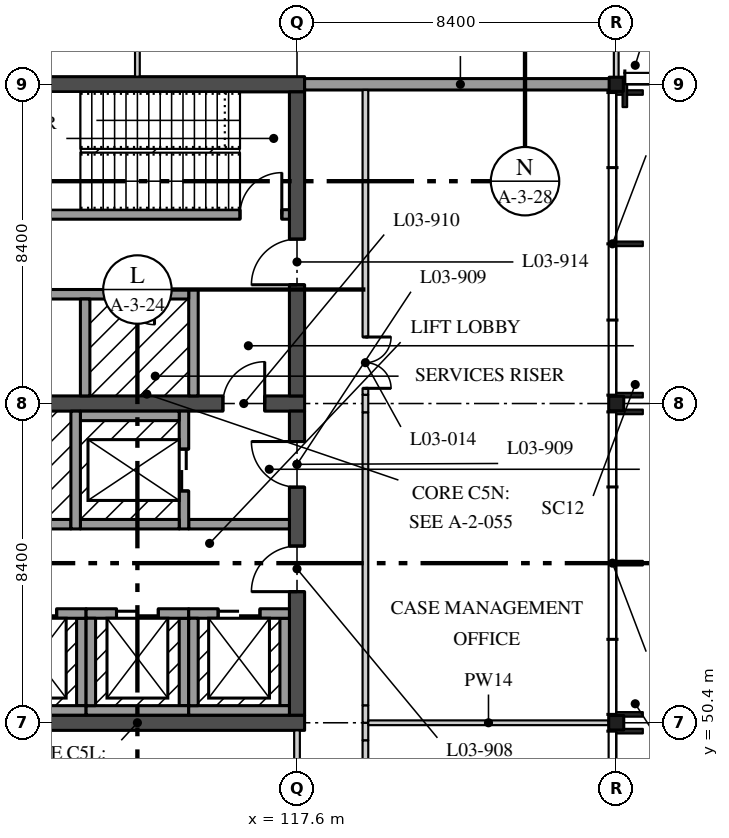
"""IFC4 building model, lengths in metres.
Left out: names, types, materials, properties, quantities, classifications, styles, units other than length and angle.
Written with IfcOpenShell. Run it as: python <this file> out.ifc"""

import sys

from ifc_helpers import new_model, si_unit, direction, frame, frame_2d, origin, origin_2d, place, context, subcontext, project, spatial, rectangle, i_section, extrude, element, fill, save


model = new_model("IFC4")
c1 = context("Model", 3, precision=1e-05, world=origin(), true_north=direction((0.0, 1.0)))
c2 = subcontext(c1, "Body", "Model", "MODEL_VIEW")
j1 = project(units=[si_unit("LENGTHUNIT", "METRE"), si_unit("PLANEANGLEUNIT", "RADIAN")], contexts=[c1])
p1 = place(None, origin())
s1 = spatial("IfcSite", under=j1, at=p1, CompositionType="ELEMENT")
p2 = place(p1, origin())
s2 = spatial("IfcBuilding", under=s1, at=p2, CompositionType="ELEMENT")
p3 = place(p2, frame((0.0, 0.0, 14.4)))
s3 = spatial("IfcBuildingStorey", under=s2, at=p3, CompositionType="ELEMENT", Elevation=14.4)
for number, where, z_axis, x_axis in (
    (1, (126.0, 50.4, 0.0), (0.0, 0.0, 1.0), (1.0, 0.0, 0.0)),
    (2, (126.0, 58.8, 0.0), (0.0, 0.0, 1.0), (1.0, 0.0, 0.0)),
):
    element("IfcColumn", number, at=place(p3, frame(where, z_axis=z_axis, x_axis=x_axis)), inside=s3, PredefinedType="COLUMN", context=c2, shape_type="SweptSolid", body=[
        extrude(i_section(OverallWidth=0.396, OverallDepth=0.381, WebThickness=0.019, FlangeThickness=0.03, FilletRadius=0.015, at=origin_2d()), origin(), (0.0, 0.0, 1.0), 4.37),
    ])
p4 = place(p3, frame((126.0, 67.2, 0.0), z_axis=(0.0, 0.0, 1.0), x_axis=(1.0, 0.0, 0.0)))
e3 = element("IfcColumn", 3, at=p4, inside=s3, PredefinedType="COLUMN", context=c2, shape_type="SweptSolid", body=[
    extrude(i_section(OverallWidth=0.373, OverallDepth=0.373, WebThickness=0.016, FlangeThickness=0.026, FilletRadius=0.015, at=origin_2d()), origin(), (0.0, 0.0, 1.0), 4.37),
])
p5 = place(p3, frame((109.0, 50.4, 0.0), z_axis=(0.0, 0.0, 1.0), x_axis=(1.0, 0.0, 0.0)))
e4 = element("IfcWall", 4, at=p5, inside=s3, PredefinedType="SHEAR", context=c2, shape_type="SweptSolid", body=[
    extrude(rectangle(XDim=8.8, YDim=0.4, at=frame_2d((4.4, 0.0))), origin(), (0.0, 0.0, 1.0), 4.37),
])
p6 = place(p3, frame((109.0, 58.8, 0.0), z_axis=(0.0, 0.0, 1.0), x_axis=(1.0, 0.0, 0.0)))
e5 = element("IfcWall", 5, at=p6, inside=s3, PredefinedType="SHEAR", context=c2, shape_type="SweptSolid", body=[
    extrude(rectangle(XDim=8.8, YDim=0.4, at=frame_2d((4.4, 0.0))), origin(), (0.0, 0.0, 1.0), 4.37),
])
p7 = place(p6, frame((6.65, 0.0, 0.0)))
e6 = element("IfcOpeningElement", 6, at=p7, cuts=e5, PredefinedType="OPENING", context=c2, shape_type="SweptSolid", body=[
    extrude(rectangle(XDim=1.1, YDim=2.1, at=frame_2d((0.55, 1.05))), frame((0.0, 0.21, 0.0), z_axis=(0.0, -1.0, 0.0), x_axis=(1.0, 0.0, 0.0)), (0.0, 0.0, 1.0), 0.42),
])
p8 = place(p3, frame((117.6, 50.6, 0.0), z_axis=(0.0, 0.0, 1.0), x_axis=(0.0, 1.0, 0.0)))
e7 = element("IfcWall", 7, at=p8, inside=s3, PredefinedType="SHEAR", context=c2, shape_type="SweptSolid", body=[
    extrude(rectangle(XDim=8.0, YDim=0.4, at=frame_2d((4.0, 0.0))), origin(), (0.0, 0.0, 1.0), 4.37),
])
p9 = place(p8, frame((3.25, 0.0, 0.0)))
e8 = element("IfcOpeningElement", 8, at=p9, cuts=e7, PredefinedType="OPENING", context=c2, shape_type="SweptSolid", body=[
    extrude(rectangle(XDim=1.2, YDim=2.1, at=frame_2d((0.6, 1.05))), frame((0.0, 0.21, 0.0), z_axis=(0.0, -1.0, 0.0), x_axis=(1.0, 0.0, 0.0)), (0.0, 0.0, 1.0), 0.42),
])
p10 = place(p8, frame((6.0, 0.0, 0.0)))
e9 = element("IfcOpeningElement", 9, at=p10, cuts=e7, PredefinedType="OPENING", context=c2, shape_type="SweptSolid", body=[
    extrude(rectangle(XDim=1.2, YDim=2.1, at=frame_2d((0.6, 1.05))), frame((0.0, 0.21, 0.0), z_axis=(0.0, -1.0, 0.0), x_axis=(1.0, 0.0, 0.0)), (0.0, 0.0, 1.0), 0.42),
])
p11 = place(p3, frame((109.4, 55.625, 0.0), z_axis=(0.0, 0.0, 1.0), x_axis=(1.0, 0.0, 0.0)))
e10 = element("IfcWall", 10, at=p11, inside=s3, PredefinedType="SOLIDWALL", context=c2, shape_type="SweptSolid", body=[
    extrude(rectangle(XDim=2.25, YDim=0.25, at=frame_2d((1.125, 0.0))), origin(), (0.0, 0.0, 1.0), 4.37),
])
p12 = place(p11, frame((0.675, 0.0, 0.0)))
e11 = element("IfcOpeningElement", 11, at=p12, cuts=e10, PredefinedType="OPENING", context=c2, shape_type="SweptSolid", body=[
    extrude(rectangle(XDim=0.9, YDim=2.1, at=frame_2d((0.45, 1.05))), frame((0.0, 0.135, 0.0), z_axis=(0.0, -1.0, 0.0), x_axis=(1.0, 0.0, 0.0)), (0.0, 0.0, 1.0), 0.27),
])
p13 = place(p3, frame((114.75, 55.625, 0.0), z_axis=(0.0, 0.0, 1.0), x_axis=(1.0, 0.0, 0.0)))
e12 = element("IfcWall", 12, at=p13, inside=s3, PredefinedType="SOLIDWALL", context=c2, shape_type="SweptSolid", body=[
    extrude(rectangle(XDim=2.65, YDim=0.25, at=frame_2d((1.325, 0.0))), origin(), (0.0, 0.0, 1.0), 4.37),
])
p14 = place(p3, frame((109.0, 67.2, 0.0), z_axis=(0.0, 0.0, 1.0), x_axis=(1.0, 0.0, 0.0)))
e13 = element("IfcWall", 13, at=p14, inside=s3, PredefinedType="SHEAR", context=c2, shape_type="SweptSolid", body=[
    extrude(rectangle(XDim=8.8, YDim=0.4, at=frame_2d((4.4, 0.0))), origin(), (0.0, 0.0, 1.0), 4.37),
])
p15 = place(p3, frame((117.6, 59.0, 0.0), z_axis=(0.0, 0.0, 1.0), x_axis=(0.0, 1.0, 0.0)))
e14 = element("IfcWall", 14, at=p15, inside=s3, PredefinedType="SHEAR", context=c2, shape_type="SweptSolid", body=[
    extrude(rectangle(XDim=8.0, YDim=0.4, at=frame_2d((4.0, 0.0))), origin(), (0.0, 0.0, 1.0), 4.37),
])
p16 = place(p15, frame((2.925, 0.0, 0.0)))
e15 = element("IfcOpeningElement", 15, at=p16, cuts=e14, PredefinedType="OPENING", context=c2, shape_type="SweptSolid", body=[
    extrude(rectangle(XDim=1.2, YDim=2.1, at=frame_2d((0.6, 1.05))), frame((0.0, 0.21, 0.0), z_axis=(0.0, -1.0, 0.0), x_axis=(1.0, 0.0, 0.0)), (0.0, 0.0, 1.0), 0.42),
])
p17 = place(p3, frame((117.4, 63.775, 0.0), z_axis=(0.0, 0.0, 1.0), x_axis=(-1.0, 0.0, 0.0)))
e16 = element("IfcWall", 16, at=p17, inside=s3, PredefinedType="SOLIDWALL", context=c2, shape_type="SweptSolid", body=[
    extrude(rectangle(XDim=8.0, YDim=0.25, at=frame_2d((4.0, 0.0))), origin(), (0.0, 0.0, 1.0), 4.37),
])
p18 = place(p17, frame((0.2, 0.0, 0.0)))
e17 = element("IfcOpeningElement", 17, at=p18, cuts=e16, PredefinedType="OPENING", context=c2, shape_type="SweptSolid", body=[
    extrude(rectangle(XDim=1.1, YDim=2.1, at=frame_2d((0.55, 1.05))), frame((0.0, 0.135, 0.0), z_axis=(0.0, -1.0, 0.0), x_axis=(1.0, 0.0, 0.0)), (0.0, 0.0, 1.0), 0.27),
])
p19 = place(p3, frame((114.875, 61.8, 0.0), z_axis=(0.0, 0.0, 1.0), x_axis=(0.0, -1.0, 0.0)))
e18 = element("IfcWall", 18, at=p19, inside=s3, PredefinedType="SOLIDWALL", context=c2, shape_type="SweptSolid", body=[
    extrude(rectangle(XDim=2.8, YDim=0.25, at=frame_2d((1.4, 0.0))), origin(), (0.0, 0.0, 1.0), 4.37),
])
p20 = place(p3, frame((114.75, 61.675, 0.0), z_axis=(0.0, 0.0, 1.0), x_axis=(-1.0, 0.0, 0.0)))
e19 = element("IfcWall", 19, at=p20, inside=s3, PredefinedType="SOLIDWALL", context=c2, shape_type="SweptSolid", body=[
    extrude(rectangle(XDim=5.35, YDim=0.25, at=frame_2d((2.675, 0.0))), origin(), (0.0, 0.0, 1.0), 4.37),
])
p21 = place(p20, frame((3.65, 0.0, 0.0)))
e20 = element("IfcOpeningElement", 20, at=p21, cuts=e19, PredefinedType="OPENING", context=c2, shape_type="SweptSolid", body=[
    extrude(rectangle(XDim=0.9, YDim=2.1, at=frame_2d((0.45, 1.05))), frame((0.0, 0.135, 0.0), z_axis=(0.0, -1.0, 0.0), x_axis=(1.0, 0.0, 0.0)), (0.0, 0.0, 1.0), 0.27),
])
p22 = place(p20, frame((0.9, 0.0, 0.0)))
e21 = element("IfcOpeningElement", 21, at=p22, cuts=e19, PredefinedType="OPENING", context=c2, shape_type="SweptSolid", body=[
    extrude(rectangle(XDim=0.8, YDim=2.1, at=frame_2d((0.4, 1.05))), frame((0.0, 0.135, 0.0), z_axis=(0.0, -1.0, 0.0), x_axis=(1.0, 0.0, 0.0)), (0.0, 0.0, 1.0), 0.27),
])
p23 = place(p3, frame((112.025, 61.55, 0.0), z_axis=(0.0, 0.0, 1.0), x_axis=(0.0, -1.0, 0.0)))
e22 = element("IfcWall", 22, at=p23, inside=s3, PredefinedType="SOLIDWALL", context=c2, shape_type="SweptSolid", body=[
    extrude(rectangle(XDim=2.55, YDim=0.25, at=frame_2d((1.275, 0.0))), origin(), (0.0, 0.0, 1.0), 4.37),
])
p24 = place(p3, frame((114.625, 55.5, 0.0), z_axis=(0.0, 0.0, 1.0), x_axis=(0.0, 1.0, 0.0)))
e23 = element("IfcWall", 23, at=p24, inside=s3, PredefinedType="SOLIDWALL", context=c2, shape_type="SweptSolid", body=[
    extrude(rectangle(XDim=3.1, YDim=0.25, at=frame_2d((1.55, 0.0))), origin(), (0.0, 0.0, 1.0), 4.37),
])
p25 = place(p24, frame((1.0, 0.0, 0.0)))
e24 = element("IfcOpeningElement", 24, at=p25, cuts=e23, PredefinedType="OPENING", context=c2, shape_type="SweptSolid", body=[
    extrude(rectangle(XDim=1.1, YDim=2.1, at=frame_2d((0.55, 1.05))), frame((0.0, 0.135, 0.0), z_axis=(0.0, -1.0, 0.0), x_axis=(1.0, 0.0, 0.0)), (0.0, 0.0, 1.0), 0.27),
])
for number, where, z_axis, x_axis in (
    (25, (111.9, 58.475, 0.0), (0.0, 0.0, 1.0), (1.0, 0.0, 0.0)),
    (26, (111.9, 55.625, 0.0), (0.0, 0.0, 1.0), (1.0, 0.0, 0.0)),
):
    element("IfcWall", number, at=place(p3, frame(where, z_axis=z_axis, x_axis=x_axis)), inside=s3, PredefinedType="SOLIDWALL", context=c2, shape_type="SweptSolid", body=[
        extrude(rectangle(XDim=2.6, YDim=0.25, at=frame_2d((1.3, 0.0))), origin(), (0.0, 0.0, 1.0), 4.37),
    ])
p26 = place(p3, frame((111.775, 55.5, 0.0), z_axis=(0.0, 0.0, 1.0), x_axis=(0.0, 1.0, 0.0)))
e27 = element("IfcWall", 27, at=p26, inside=s3, PredefinedType="SOLIDWALL", context=c2, shape_type="SweptSolid", body=[
    extrude(rectangle(XDim=3.1, YDim=0.25, at=frame_2d((1.55, 0.0))), origin(), (0.0, 0.0, 1.0), 4.37),
])
p27 = place(p3, frame((111.925, 50.85, 0.0), z_axis=(0.0, 0.0, 1.0), x_axis=(0.0, 1.0, 0.0)))
e28 = element("IfcWall", 28, at=p27, inside=s3, PredefinedType="SOLIDWALL", context=c2, shape_type="SweptSolid", body=[
    extrude(rectangle(XDim=2.3, YDim=0.25, at=frame_2d((1.15, 0.0))), origin(), (0.0, 0.0, 1.0), 4.37),
])
p28 = place(p3, frame((109.4, 53.275, 0.0), z_axis=(0.0, 0.0, 1.0), x_axis=(1.0, 0.0, 0.0)))
e29 = element("IfcWall", 29, at=p28, inside=s3, PredefinedType="SOLIDWALL", context=c2, shape_type="SweptSolid", body=[
    extrude(rectangle(XDim=2.65, YDim=0.25, at=frame_2d((1.325, 0.0))), origin(), (0.0, 0.0, 1.0), 4.37),
])
p29 = place(p28, frame((0.775, 0.0, 0.0)))
e30 = element("IfcOpeningElement", 30, at=p29, cuts=e29, PredefinedType="OPENING", context=c2, shape_type="SweptSolid", body=[
    extrude(rectangle(XDim=1.1, YDim=2.1, at=frame_2d((0.55, 1.05))), frame((0.0, 0.135, 0.0), z_axis=(0.0, -1.0, 0.0), x_axis=(1.0, 0.0, 0.0)), (0.0, 0.0, 1.0), 0.27),
])
p30 = place(p3, frame((109.4, 50.725, 0.0), z_axis=(0.0, 0.0, 1.0), x_axis=(1.0, 0.0, 0.0)))
e31 = element("IfcWall", 31, at=p30, inside=s3, PredefinedType="SOLIDWALL", context=c2, shape_type="SweptSolid", body=[
    extrude(rectangle(XDim=2.65, YDim=0.25, at=frame_2d((1.325, 0.0))), origin(), (0.0, 0.0, 1.0), 4.37),
])
p31 = place(p3, frame((114.625, 50.85, 0.0), z_axis=(0.0, 0.0, 1.0), x_axis=(0.0, 1.0, 0.0)))
e32 = element("IfcWall", 32, at=p31, inside=s3, PredefinedType="SOLIDWALL", context=c2, shape_type="SweptSolid", body=[
    extrude(rectangle(XDim=2.3, YDim=0.25, at=frame_2d((1.15, 0.0))), origin(), (0.0, 0.0, 1.0), 4.37),
])
p32 = place(p3, frame((112.05, 53.275, 0.0), z_axis=(0.0, 0.0, 1.0), x_axis=(1.0, 0.0, 0.0)))
e33 = element("IfcWall", 33, at=p32, inside=s3, PredefinedType="SOLIDWALL", context=c2, shape_type="SweptSolid", body=[
    extrude(rectangle(XDim=2.7, YDim=0.25, at=frame_2d((1.35, 0.0))), origin(), (0.0, 0.0, 1.0), 4.37),
])
p33 = place(p32, frame((0.8, 0.0, 0.0)))
e34 = element("IfcOpeningElement", 34, at=p33, cuts=e33, PredefinedType="OPENING", context=c2, shape_type="SweptSolid", body=[
    extrude(rectangle(XDim=1.1, YDim=2.1, at=frame_2d((0.55, 1.05))), frame((0.0, 0.135, 0.0), z_axis=(0.0, -1.0, 0.0), x_axis=(1.0, 0.0, 0.0)), (0.0, 0.0, 1.0), 0.27),
])
p34 = place(p3, frame((112.05, 50.725, 0.0), z_axis=(0.0, 0.0, 1.0), x_axis=(1.0, 0.0, 0.0)))
e35 = element("IfcWall", 35, at=p34, inside=s3, PredefinedType="SOLIDWALL", context=c2, shape_type="SweptSolid", body=[
    extrude(rectangle(XDim=2.7, YDim=0.25, at=frame_2d((1.35, 0.0))), origin(), (0.0, 0.0, 1.0), 4.37),
])
for number, where, z_axis, x_axis in (
    (36, (112.175, 50.85, 0.0), (0.0, 0.0, 1.0), (0.0, 1.0, 0.0)),
    (37, (117.275, 50.85, 0.0), (0.0, 0.0, 1.0), (0.0, 1.0, 0.0)),
):
    element("IfcWall", number, at=place(p3, frame(where, z_axis=z_axis, x_axis=x_axis)), inside=s3, PredefinedType="SOLIDWALL", context=c2, shape_type="SweptSolid", body=[
        extrude(rectangle(XDim=2.3, YDim=0.25, at=frame_2d((1.15, 0.0))), origin(), (0.0, 0.0, 1.0), 4.37),
    ])
p35 = place(p3, frame((114.75, 53.275, 0.0), z_axis=(0.0, 0.0, 1.0), x_axis=(1.0, 0.0, 0.0)))
e38 = element("IfcWall", 38, at=p35, inside=s3, PredefinedType="SOLIDWALL", context=c2, shape_type="SweptSolid", body=[
    extrude(rectangle(XDim=2.65, YDim=0.25, at=frame_2d((1.325, 0.0))), origin(), (0.0, 0.0, 1.0), 4.37),
])
p36 = place(p35, frame((0.775, 0.0, 0.0)))
e39 = element("IfcOpeningElement", 39, at=p36, cuts=e38, PredefinedType="OPENING", context=c2, shape_type="SweptSolid", body=[
    extrude(rectangle(XDim=1.1, YDim=2.1, at=frame_2d((0.55, 1.05))), frame((0.0, 0.135, 0.0), z_axis=(0.0, -1.0, 0.0), x_axis=(1.0, 0.0, 0.0)), (0.0, 0.0, 1.0), 0.27),
])
p37 = place(p3, frame((114.75, 50.725, 0.0), z_axis=(0.0, 0.0, 1.0), x_axis=(1.0, 0.0, 0.0)))
e40 = element("IfcWall", 40, at=p37, inside=s3, PredefinedType="SOLIDWALL", context=c2, shape_type="SweptSolid", body=[
    extrude(rectangle(XDim=2.65, YDim=0.25, at=frame_2d((1.325, 0.0))), origin(), (0.0, 0.0, 1.0), 4.37),
])
p38 = place(p3, frame((114.875, 50.85, 0.0), z_axis=(0.0, 0.0, 1.0), x_axis=(0.0, 1.0, 0.0)))
e41 = element("IfcWall", 41, at=p38, inside=s3, PredefinedType="SOLIDWALL", context=c2, shape_type="SweptSolid", body=[
    extrude(rectangle(XDim=2.3, YDim=0.25, at=frame_2d((1.15, 0.0))), origin(), (0.0, 0.0, 1.0), 4.37),
])
p39 = place(p3, frame((119.4, 42.23, 0.0), z_axis=(0.0, 0.0, 1.0), x_axis=(0.0, 1.0, 0.0)))
e42 = element("IfcWall", 42, at=p39, inside=s3, PredefinedType="PARTITIONING", context=c2, shape_type="SweptSolid", body=[
    extrude(rectangle(XDim=7.71, YDim=0.15, at=frame_2d((3.855, 0.0))), origin(), (0.0, 0.0, 1.0), 4.37),
])
p40 = place(p3, frame((119.4, 49.94, 0.0), z_axis=(0.0, 0.0, 1.0), x_axis=(0.0, 1.0, 0.0)))
e43 = element("IfcWall", 43, at=p40, inside=s3, PredefinedType="PARTITIONING", context=c2, shape_type="SweptSolid", body=[
    extrude(rectangle(XDim=0.46, YDim=0.15, at=frame_2d((0.23, 0.0))), origin(), (0.0, 0.0, 1.0), 3.746),
])
p41 = place(p3, frame((119.4, 50.4, 0.0), z_axis=(0.0, 0.0, 1.0), x_axis=(0.0, 1.0, 0.0)))
e44 = element("IfcWall", 44, at=p41, inside=s3, PredefinedType="PARTITIONING", context=c2, shape_type="SweptSolid", body=[
    extrude(rectangle(XDim=0.46, YDim=0.15, at=frame_2d((0.23, 0.0))), origin(), (0.0, 0.0, 1.0), 3.746),
])
p42 = place(p3, frame((119.4, 50.86, 0.0), z_axis=(0.0, 0.0, 1.0), x_axis=(0.0, 1.0, 0.0)))
e45 = element("IfcWall", 45, at=p42, inside=s3, PredefinedType="PARTITIONING", context=c2, shape_type="SweptSolid", body=[
    extrude(rectangle(XDim=7.71, YDim=0.15, at=frame_2d((3.855, 0.0))), origin(), (0.0, 0.0, 1.0), 4.37),
])
p43 = place(p3, frame((119.4, 58.57, 0.0), z_axis=(0.0, 0.0, 1.0), x_axis=(0.0, 1.0, 0.0)))
e46 = element("IfcWall", 46, at=p43, inside=s3, PredefinedType="PARTITIONING", context=c2, shape_type="SweptSolid", body=[
    extrude(rectangle(XDim=0.46, YDim=0.15, at=frame_2d((0.23, 0.0))), origin(), (0.0, 0.0, 1.0), 3.746),
])
p44 = place(p3, frame((119.4, 59.03, 0.0), z_axis=(0.0, 0.0, 1.0), x_axis=(0.0, 1.0, 0.0)))
e47 = element("IfcWall", 47, at=p44, inside=s3, PredefinedType="PARTITIONING", context=c2, shape_type="SweptSolid", body=[
    extrude(rectangle(XDim=8.02, YDim=0.15, at=frame_2d((4.01, 0.0))), origin(), (0.0, 0.0, 1.0), 4.37),
])
p45 = place(p44, frame((0.17, 0.0, 0.0)))
e48 = element("IfcOpeningElement", 48, at=p45, cuts=e47, PredefinedType="OPENING", context=c2, shape_type="SweptSolid", body=[
    extrude(rectangle(XDim=1.35, YDim=2.1, at=frame_2d((0.675, 1.05))), frame((0.0, 0.085, 0.0), z_axis=(0.0, -1.0, 0.0), x_axis=(1.0, 0.0, 0.0)), (0.0, 0.0, 1.0), 0.17),
])
p46 = place(p3, frame((117.6, 42.2, 0.0), z_axis=(0.0, 0.0, 1.0), x_axis=(0.0, 1.0, 0.0)))
e49 = element("IfcWall", 49, at=p46, inside=s3, PredefinedType="PARTITIONING", context=c2, shape_type="SweptSolid", body=[
    extrude(rectangle(XDim=8.0, YDim=0.15, at=frame_2d((4.0, 0.0))), origin(), (0.0, 0.0, 1.0), 3.746),
])
p47 = place(p46, frame((3.4, 0.0, 0.0)))
e50 = element("IfcOpeningElement", 50, at=p47, cuts=e49, PredefinedType="OPENING", context=c2, shape_type="SweptSolid", body=[
    extrude(rectangle(XDim=1.2, YDim=2.4, at=frame_2d((0.6, 1.2))), frame((0.0, 0.085, 0.0), z_axis=(0.0, -1.0, 0.0), x_axis=(1.0, 0.0, 0.0)), (0.0, 0.0, 1.0), 0.17),
])
p48 = place(p3, frame((119.475, 50.4, 0.0), z_axis=(0.0, 0.0, 1.0), x_axis=(1.0, 0.0, 0.0)))
e51 = element("IfcWall", 51, at=p48, inside=s3, PredefinedType="PARTITIONING", context=c2, shape_type="SweptSolid", body=[
    extrude(rectangle(XDim=6.327, YDim=0.125, at=frame_2d((3.164, 0.0))), origin(), (0.0, 0.0, 1.0), 3.746),
])
p49 = place(p3, frame((113.4, 67.4, 0.0), z_axis=(0.0, 0.0, 1.0), x_axis=(0.0, 1.0, 0.0)))
e52 = element("IfcWall", 52, at=p49, inside=s3, PredefinedType="PARTITIONING", context=c2, shape_type="SweptSolid", body=[
    extrude(rectangle(XDim=6.625, YDim=0.125, at=frame_2d((3.312, 0.0))), origin(), (0.0, 0.0, 1.0), 4.37),
])
p50 = place(p3, frame((126.0, 67.386, 0.0), z_axis=(0.0, 0.0, 1.0), x_axis=(0.0, 1.0, 0.0)))
e53 = element("IfcWall", 53, at=p50, inside=s3, PredefinedType="PARTITIONING", context=c2, shape_type="SweptSolid", body=[
    extrude(rectangle(XDim=6.639, YDim=0.125, at=frame_2d((3.319, 0.0))), origin(), (0.0, 0.0, 1.0), 3.746),
])
p51 = place(p3, frame((125.998, 67.2, 0.0), z_axis=(0.0, 0.0, 1.0), x_axis=(-1.0, 0.0, 0.0)))
e54 = element("IfcWall", 54, at=p51, inside=s3, PredefinedType="SOLIDWALL", context=c2, shape_type="SweptSolid", body=[
    extrude(rectangle(XDim=8.198, YDim=0.3, at=frame_2d((4.099, 0.0))), origin(), (0.0, 0.0, 1.0), 3.746),
])
p52 = place(p9, origin())
e55 = element("IfcDoor", 55, at=p52, inside=s3, OperationType="SINGLE_SWING_RIGHT", PredefinedType="DOOR", context=c2, shape_type="SweptSolid", body=[
    extrude(rectangle(XDim=1.2, YDim=2.1, at=frame_2d((0.6, 1.05))), frame((0.0, 0.035, 0.0), z_axis=(0.0, -1.0, 0.0), x_axis=(1.0, 0.0, 0.0)), (0.0, 0.0, 1.0), 0.07),
])
fill(e8, e55)
p53 = place(p10, origin())
e56 = element("IfcDoor", 56, at=p53, inside=s3, OperationType="SINGLE_SWING_LEFT", PredefinedType="DOOR", context=c2, shape_type="SweptSolid", body=[
    extrude(rectangle(XDim=1.2, YDim=2.1, at=frame_2d((0.6, 1.05))), frame((0.0, 0.035, 0.0), z_axis=(0.0, -1.0, 0.0), x_axis=(1.0, 0.0, 0.0)), (0.0, 0.0, 1.0), 0.07),
])
fill(e9, e56)
p54 = place(p7, origin())
e57 = element("IfcDoor", 57, at=p54, inside=s3, OperationType="SINGLE_SWING_LEFT", PredefinedType="DOOR", context=c2, shape_type="SweptSolid", body=[
    extrude(rectangle(XDim=1.1, YDim=2.1, at=frame_2d((0.55, 1.05))), frame((0.0, 0.035, 0.0), z_axis=(0.0, -1.0, 0.0), x_axis=(1.0, 0.0, 0.0)), (0.0, 0.0, 1.0), 0.07),
])
fill(e6, e57)
p55 = place(p16, origin())
e58 = element("IfcDoor", 58, at=p55, inside=s3, OperationType="SINGLE_SWING_RIGHT", PredefinedType="DOOR", context=c2, shape_type="SweptSolid", body=[
    extrude(rectangle(XDim=1.2, YDim=2.1, at=frame_2d((0.6, 1.05))), frame((0.0, 0.035, 0.0), z_axis=(0.0, -1.0, 0.0), x_axis=(1.0, 0.0, 0.0)), (0.0, 0.0, 1.0), 0.07),
])
fill(e15, e58)
p56 = place(p22, origin())
e59 = element("IfcDoor", 59, at=p56, inside=s3, OperationType="SINGLE_SWING_RIGHT", PredefinedType="DOOR", context=c2, shape_type="SweptSolid", body=[
    extrude(rectangle(XDim=0.8, YDim=2.1, at=frame_2d((0.4, 1.05))), frame((0.0, 0.035, 0.0), z_axis=(0.0, -1.0, 0.0), x_axis=(1.0, 0.0, 0.0)), (0.0, 0.0, 1.0), 0.07),
])
fill(e21, e59)
p57 = place(p18, frame((1.1, 0.0, 0.0), z_axis=(0.0, 0.0, 1.0), x_axis=(-1.0, 0.0, 0.0)))
e60 = element("IfcDoor", 60, at=p57, inside=s3, OperationType="SINGLE_SWING_LEFT", PredefinedType="DOOR", context=c2, shape_type="SweptSolid", body=[
    extrude(rectangle(XDim=1.1, YDim=2.1, at=frame_2d((0.55, 1.05))), frame((0.0, 0.035, 0.0), z_axis=(0.0, -1.0, 0.0), x_axis=(1.0, 0.0, 0.0)), (0.0, 0.0, 1.0), 0.07),
])
fill(e17, e60)
p58 = place(p25, origin())
e61 = element("IfcDoor", 61, at=p58, inside=s3, OperationType="DOUBLE_DOOR_SLIDING", PredefinedType="DOOR", context=c2, shape_type="SweptSolid", body=[
    extrude(rectangle(XDim=1.1, YDim=2.1, at=frame_2d((0.55, 1.05))), frame((0.0, 0.04, 0.0), z_axis=(0.0, -1.0, 0.0), x_axis=(1.0, 0.0, 0.0)), (0.0, 0.0, 1.0), 0.08),
])
fill(e24, e61)
p59 = place(p29, origin())
e62 = element("IfcDoor", 62, at=p59, inside=s3, OperationType="DOUBLE_DOOR_SLIDING", PredefinedType="DOOR", context=c2, shape_type="SweptSolid", body=[
    extrude(rectangle(XDim=1.1, YDim=2.1, at=frame_2d((0.55, 1.05))), frame((0.0, 0.04, 0.0), z_axis=(0.0, -1.0, 0.0), x_axis=(1.0, 0.0, 0.0)), (0.0, 0.0, 1.0), 0.08),
])
fill(e30, e62)
p60 = place(p33, origin())
e63 = element("IfcDoor", 63, at=p60, inside=s3, OperationType="DOUBLE_DOOR_SLIDING", PredefinedType="DOOR", context=c2, shape_type="SweptSolid", body=[
    extrude(rectangle(XDim=1.1, YDim=2.1, at=frame_2d((0.55, 1.05))), frame((0.0, 0.04, 0.0), z_axis=(0.0, -1.0, 0.0), x_axis=(1.0, 0.0, 0.0)), (0.0, 0.0, 1.0), 0.08),
])
fill(e34, e63)
p61 = place(p36, origin())
e64 = element("IfcDoor", 64, at=p61, inside=s3, OperationType="DOUBLE_DOOR_SLIDING", PredefinedType="DOOR", context=c2, shape_type="SweptSolid", body=[
    extrude(rectangle(XDim=1.1, YDim=2.1, at=frame_2d((0.55, 1.05))), frame((0.0, 0.04, 0.0), z_axis=(0.0, -1.0, 0.0), x_axis=(1.0, 0.0, 0.0)), (0.0, 0.0, 1.0), 0.08),
])
fill(e39, e64)
p62 = place(p45, frame((1.35, 0.0, 0.0), z_axis=(0.0, 0.0, 1.0), x_axis=(-1.0, 0.0, 0.0)))
e65 = element("IfcDoor", 65, at=p62, inside=s3, OperationType="DOUBLE_DOOR_SINGLE_SWING", PredefinedType="DOOR", context=c2, shape_type="SweptSolid", body=[
    extrude(rectangle(XDim=1.35, YDim=2.1, at=frame_2d((0.675, 1.05))), frame((0.0, 0.025, 0.0), z_axis=(0.0, -1.0, 0.0), x_axis=(1.0, 0.0, 0.0)), (0.0, 0.0, 1.0), 0.05),
])
fill(e48, e65)
save(model, sys.argv[1])
